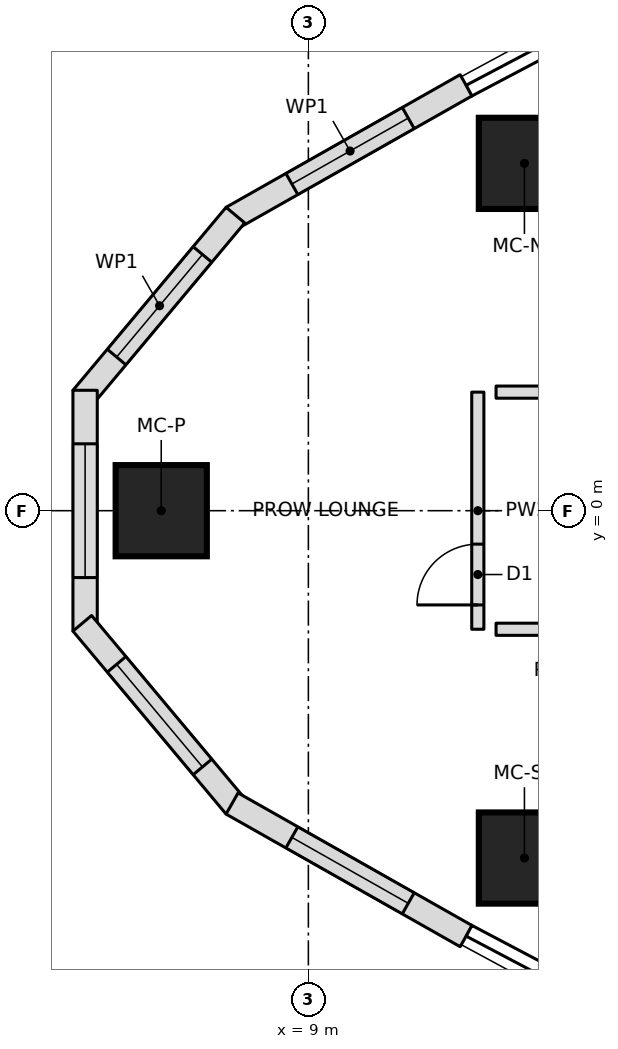
"""IFC4 building model, lengths in metres.
Left out: names, types, materials, properties, quantities, classifications, styles, units other than length and angle.
Written with IfcOpenShell. Run it as: python <this file> out.ifc"""

import sys

from ifc_helpers import new_model, si_unit, direction, frame, frame_2d, origin, origin_2d, place, context, subcontext, project, spatial, polyline, rectangle, outline, extrude, element, fill, save


model = new_model("IFC4")
c1 = context("Model", 3, precision=1e-05, world=origin(), true_north=direction((0.0, 1.0)))
c2 = subcontext(c1, "Body", "Model", "MODEL_VIEW")
j1 = project(units=[si_unit("LENGTHUNIT", "METRE"), si_unit("PLANEANGLEUNIT", "RADIAN")], contexts=[c1])
p1 = place(None, origin())
s1 = spatial("IfcSite", under=j1, at=p1, CompositionType="ELEMENT")
p2 = place(p1, origin())
s2 = spatial("IfcBuilding", under=s1, at=p2, CompositionType="ELEMENT")
p3 = place(p2, frame((0.0, 0.0, 140.85)))
s3 = spatial("IfcBuildingStorey", under=s2, at=p3, CompositionType="ELEMENT", Elevation=140.85)
for number, where, z_axis, x_axis in (
    (1, (6.58, 0.0, 0.0), (0.0, 0.0, 1.0), (1.0, 0.0, 0.0)),
    (2, (12.553, -5.713, 0.0), (0.0, 0.0, 1.0), (1.0, 0.0, 0.0)),
    (3, (12.553, 5.713, 0.0), (0.0, 0.0, 1.0), (1.0, 0.0, 0.0)),
):
    element("IfcColumn", number, at=place(p3, frame(where, z_axis=z_axis, x_axis=x_axis)), inside=s3, PredefinedType="COLUMN", context=c2, shape_type="SweptSolid", body=[
        extrude(rectangle(XDim=1.5, YDim=1.5, at=origin_2d()), origin(), (0.0, 0.0, 1.0), 3.55),
    ])
p4 = place(p3, frame((11.594, 6.997, 0.0), z_axis=(0.0, 0.0, 1.0), x_axis=(-0.870045255208, -0.492971859125, 0.0)))
e4 = element("IfcWall", 4, at=p4, inside=s3, PredefinedType="NOTDEFINED", context=c2, shape_type="SweptSolid", body=[
    extrude(outline(polyline([(0.0, -0.2), (4.424, -0.2), (4.352, 0.2), (0.0, 0.2), (0.0, -0.2)])), origin(), (0.0, 0.0, 1.0), 3.25),
])
p5 = place(p4, frame((1.094, 0.0, 0.6)))
e5 = element("IfcOpeningElement", 5, at=p5, cuts=e4, PredefinedType="OPENING", context=c2, shape_type="SweptSolid", body=[
    extrude(outline(polyline([(0.0, 1.35), (0.084, 1.771), (0.322, 2.128), (0.679, 2.366), (1.1, 2.45), (1.521, 2.366), (1.878, 2.128), (2.116, 1.771), (2.2, 1.35), (2.2, 1.1), (2.116, 0.679), (1.878, 0.322), (1.521, 0.084), (1.1, 0.0), (0.679, 0.084), (0.322, 0.322), (0.084, 0.679), (0.0, 1.1), (0.0, 1.35)])), frame((0.0, 0.21, 0.0), z_axis=(0.0, -1.0, 0.0), x_axis=(1.0, 0.0, 0.0)), (0.0, 0.0, 1.0), 0.42),
])
p6 = place(p3, frame((7.777, 4.834, 0.0), z_axis=(0.0, 0.0, 1.0), x_axis=(-0.641787918235, -0.766882173484, 0.0)))
e6 = element("IfcWall", 6, at=p6, inside=s3, PredefinedType="NOTDEFINED", context=c2, shape_type="SweptSolid", body=[
    extrude(outline(polyline([(-0.036, -0.2), (3.888, -0.2), (3.743, 0.2), (0.036, 0.2), (-0.036, -0.2)])), origin(), (0.0, 0.0, 1.0), 3.25),
])
p7 = place(p6, frame((0.808, 0.0, 0.6)))
e7 = element("IfcOpeningElement", 7, at=p7, cuts=e6, PredefinedType="OPENING", context=c2, shape_type="SweptSolid", body=[
    extrude(outline(polyline([(0.0, 1.35), (0.084, 1.771), (0.322, 2.128), (0.679, 2.366), (1.1, 2.45), (1.521, 2.366), (1.878, 2.128), (2.116, 1.771), (2.2, 1.35), (2.2, 1.1), (2.116, 0.679), (1.878, 0.322), (1.521, 0.084), (1.1, 0.0), (0.679, 0.084), (0.322, 0.322), (0.084, 0.679), (0.0, 1.1), (0.0, 1.35)])), frame((0.0, 0.21, 0.0), z_axis=(0.0, -1.0, 0.0), x_axis=(1.0, 0.0, 0.0)), (0.0, 0.0, 1.0), 0.42),
])
p8 = place(p3, frame((5.328, 1.908, 0.0), z_axis=(0.0, 0.0, 1.0), x_axis=(0.0, -1.0, 0.0)))
e8 = element("IfcWall", 8, at=p8, inside=s3, PredefinedType="NOTDEFINED", context=c2, shape_type="SweptSolid", body=[
    extrude(outline(polyline([(-0.073, -0.2), (3.888, -0.2), (3.743, 0.2), (0.073, 0.2), (-0.073, -0.2)])), origin(), (0.0, 0.0, 1.0), 3.25),
])
p9 = place(p8, frame((0.808, 0.0, 0.6)))
e9 = element("IfcOpeningElement", 9, at=p9, cuts=e8, PredefinedType="OPENING", context=c2, shape_type="SweptSolid", body=[
    extrude(outline(polyline([(0.0, 1.35), (0.084, 1.771), (0.322, 2.128), (0.679, 2.366), (1.1, 2.45), (1.521, 2.366), (1.878, 2.128), (2.116, 1.771), (2.2, 1.35), (2.2, 1.1), (2.116, 0.679), (1.878, 0.322), (1.521, 0.084), (1.1, 0.0), (0.679, 0.084), (0.322, 0.322), (0.084, 0.679), (0.0, 1.1), (0.0, 1.35)])), frame((0.0, 0.21, 0.0), z_axis=(0.0, -1.0, 0.0), x_axis=(1.0, 0.0, 0.0)), (0.0, 0.0, 1.0), 0.42),
])
p10 = place(p3, frame((5.328, -1.908, 0.0), z_axis=(0.0, 0.0, 1.0), x_axis=(0.641787918235, -0.766882173484, 0.0)))
e10 = element("IfcWall", 10, at=p10, inside=s3, PredefinedType="NOTDEFINED", context=c2, shape_type="SweptSolid", body=[
    extrude(outline(polyline([(-0.073, -0.2), (3.852, -0.2), (3.779, 0.2), (0.073, 0.2), (-0.073, -0.2)])), origin(), (0.0, 0.0, 1.0), 3.25),
])
p11 = place(p10, frame((0.808, 0.0, 0.6)))
e11 = element("IfcOpeningElement", 11, at=p11, cuts=e10, PredefinedType="OPENING", context=c2, shape_type="SweptSolid", body=[
    extrude(outline(polyline([(0.0, 1.35), (0.084, 1.771), (0.322, 2.128), (0.679, 2.366), (1.1, 2.45), (1.521, 2.366), (1.878, 2.128), (2.116, 1.771), (2.2, 1.35), (2.2, 1.1), (2.116, 0.679), (1.878, 0.322), (1.521, 0.084), (1.1, 0.0), (0.679, 0.084), (0.322, 0.322), (0.084, 0.679), (0.0, 1.1), (0.0, 1.35)])), frame((0.0, 0.21, 0.0), z_axis=(0.0, -1.0, 0.0), x_axis=(1.0, 0.0, 0.0)), (0.0, 0.0, 1.0), 0.42),
])
p12 = place(p3, frame((7.777, -4.834, 0.0), z_axis=(0.0, 0.0, 1.0), x_axis=(0.870045255208, -0.492971859125, 0.0)))
e12 = element("IfcWall", 12, at=p12, inside=s3, PredefinedType="NOTDEFINED", context=c2, shape_type="SweptSolid", body=[
    extrude(outline(polyline([(-0.036, -0.2), (4.388, -0.2), (4.388, 0.2), (0.036, 0.2), (-0.036, -0.2)])), origin(), (0.0, 0.0, 1.0), 3.25),
])
p13 = place(p12, frame((1.094, 0.0, 0.6)))
e13 = element("IfcOpeningElement", 13, at=p13, cuts=e12, PredefinedType="OPENING", context=c2, shape_type="SweptSolid", body=[
    extrude(outline(polyline([(0.0, 1.35), (0.084, 1.771), (0.322, 2.128), (0.679, 2.366), (1.1, 2.45), (1.521, 2.366), (1.878, 2.128), (2.116, 1.771), (2.2, 1.35), (2.2, 1.1), (2.116, 0.679), (1.878, 0.322), (1.521, 0.084), (1.1, 0.0), (0.679, 0.084), (0.322, 0.322), (0.084, 0.679), (0.0, 1.1), (0.0, 1.35)])), frame((0.0, 0.21, 0.0), z_axis=(0.0, -1.0, 0.0), x_axis=(1.0, 0.0, 0.0)), (0.0, 0.0, 1.0), 0.42),
])
p14 = place(p3, frame((12.087, 1.95, 0.0), z_axis=(0.0, 0.0, 1.0), x_axis=(1.0, 0.0, 0.0)))
e14 = element("IfcWall", 14, at=p14, inside=s3, PredefinedType="PARTITIONING", context=c2, shape_type="SweptSolid", body=[
    extrude(rectangle(XDim=3.372, YDim=0.2, at=frame_2d((1.686, 0.0))), origin(), (0.0, 0.0, 1.0), 3.25),
])
p15 = place(p14, frame((1.186, 0.0, 0.0)))
e15 = element("IfcOpeningElement", 15, at=p15, cuts=e14, PredefinedType="OPENING", context=c2, shape_type="SweptSolid", body=[
    extrude(rectangle(XDim=1.0, YDim=2.1, at=frame_2d((0.5, 1.05))), frame((0.0, 0.11, 0.0), z_axis=(0.0, -1.0, 0.0), x_axis=(1.0, 0.0, 0.0)), (0.0, 0.0, 1.0), 0.22),
])
p16 = place(p3, frame((12.087, -1.95, 0.0), z_axis=(0.0, 0.0, 1.0), x_axis=(1.0, 0.0, 0.0)))
e16 = element("IfcWall", 16, at=p16, inside=s3, PredefinedType="PARTITIONING", context=c2, shape_type="SweptSolid", body=[
    extrude(rectangle(XDim=3.372, YDim=0.2, at=frame_2d((1.686, 0.0))), origin(), (0.0, 0.0, 1.0), 3.25),
])
p17 = place(p16, frame((1.186, 0.0, 0.0)))
e17 = element("IfcOpeningElement", 17, at=p17, cuts=e16, PredefinedType="OPENING", context=c2, shape_type="SweptSolid", body=[
    extrude(rectangle(XDim=1.0, YDim=2.1, at=frame_2d((0.5, 1.05))), frame((0.0, 0.11, 0.0), z_axis=(0.0, -1.0, 0.0), x_axis=(1.0, 0.0, 0.0)), (0.0, 0.0, 1.0), 0.22),
])
p18 = place(p3, frame((11.787, -1.95, 0.0), z_axis=(0.0, 0.0, 1.0), x_axis=(0.0, 1.0, 0.0)))
e18 = element("IfcWall", 18, at=p18, inside=s3, PredefinedType="PARTITIONING", context=c2, shape_type="SweptSolid", body=[
    extrude(rectangle(XDim=3.9, YDim=0.2, at=frame_2d((1.95, 0.0))), origin(), (0.0, 0.0, 1.0), 3.25),
])
p19 = place(p18, frame((0.4, 0.0, 0.0)))
e19 = element("IfcOpeningElement", 19, at=p19, cuts=e18, PredefinedType="OPENING", context=c2, shape_type="SweptSolid", body=[
    extrude(rectangle(XDim=1.0, YDim=2.1, at=frame_2d((0.5, 1.05))), frame((0.0, 0.11, 0.0), z_axis=(0.0, -1.0, 0.0), x_axis=(1.0, 0.0, 0.0)), (0.0, 0.0, 1.0), 0.22),
])
p20 = place(p5, origin())
e20 = element("IfcWindow", 20, at=p20, inside=s3, PartitioningType="SINGLE_PANEL", PredefinedType="WINDOW", context=c2, shape_type="SweptSolid", body=[
    extrude(outline(polyline([(0.0, 1.35), (0.084, 1.771), (0.322, 2.128), (0.679, 2.366), (1.1, 2.45), (1.521, 2.366), (1.878, 2.128), (2.116, 1.771), (2.2, 1.35), (2.2, 1.1), (2.116, 0.679), (1.878, 0.322), (1.521, 0.084), (1.1, 0.0), (0.679, 0.084), (0.322, 0.322), (0.084, 0.679), (0.0, 1.1), (0.0, 1.35)])), frame((0.0, 0.17, 0.0), z_axis=(0.0, -1.0, 0.0), x_axis=(1.0, 0.0, 0.0)), (0.0, 0.0, 1.0), 0.06),
])
fill(e5, e20)
p21 = place(p7, origin())
e21 = element("IfcWindow", 21, at=p21, inside=s3, PartitioningType="SINGLE_PANEL", PredefinedType="WINDOW", context=c2, shape_type="SweptSolid", body=[
    extrude(outline(polyline([(0.0, 1.35), (0.084, 1.771), (0.322, 2.128), (0.679, 2.366), (1.1, 2.45), (1.521, 2.366), (1.878, 2.128), (2.116, 1.771), (2.2, 1.35), (2.2, 1.1), (2.116, 0.679), (1.878, 0.322), (1.521, 0.084), (1.1, 0.0), (0.679, 0.084), (0.322, 0.322), (0.084, 0.679), (0.0, 1.1), (0.0, 1.35)])), frame((0.0, 0.17, 0.0), z_axis=(0.0, -1.0, 0.0), x_axis=(1.0, 0.0, 0.0)), (0.0, 0.0, 1.0), 0.06),
])
fill(e7, e21)
p22 = place(p9, origin())
e22 = element("IfcWindow", 22, at=p22, inside=s3, PartitioningType="SINGLE_PANEL", PredefinedType="WINDOW", context=c2, shape_type="SweptSolid", body=[
    extrude(outline(polyline([(0.0, 1.35), (0.084, 1.771), (0.322, 2.128), (0.679, 2.366), (1.1, 2.45), (1.521, 2.366), (1.878, 2.128), (2.116, 1.771), (2.2, 1.35), (2.2, 1.1), (2.116, 0.679), (1.878, 0.322), (1.521, 0.084), (1.1, 0.0), (0.679, 0.084), (0.322, 0.322), (0.084, 0.679), (0.0, 1.1), (0.0, 1.35)])), frame((0.0, 0.17, 0.0), z_axis=(0.0, -1.0, 0.0), x_axis=(1.0, 0.0, 0.0)), (0.0, 0.0, 1.0), 0.06),
])
fill(e9, e22)
p23 = place(p11, origin())
e23 = element("IfcWindow", 23, at=p23, inside=s3, PartitioningType="SINGLE_PANEL", PredefinedType="WINDOW", context=c2, shape_type="SweptSolid", body=[
    extrude(outline(polyline([(0.0, 1.35), (0.084, 1.771), (0.322, 2.128), (0.679, 2.366), (1.1, 2.45), (1.521, 2.366), (1.878, 2.128), (2.116, 1.771), (2.2, 1.35), (2.2, 1.1), (2.116, 0.679), (1.878, 0.322), (1.521, 0.084), (1.1, 0.0), (0.679, 0.084), (0.322, 0.322), (0.084, 0.679), (0.0, 1.1), (0.0, 1.35)])), frame((0.0, 0.17, 0.0), z_axis=(0.0, -1.0, 0.0), x_axis=(1.0, 0.0, 0.0)), (0.0, 0.0, 1.0), 0.06),
])
fill(e11, e23)
p24 = place(p13, origin())
e24 = element("IfcWindow", 24, at=p24, inside=s3, PartitioningType="SINGLE_PANEL", PredefinedType="WINDOW", context=c2, shape_type="SweptSolid", body=[
    extrude(outline(polyline([(0.0, 1.35), (0.084, 1.771), (0.322, 2.128), (0.679, 2.366), (1.1, 2.45), (1.521, 2.366), (1.878, 2.128), (2.116, 1.771), (2.2, 1.35), (2.2, 1.1), (2.116, 0.679), (1.878, 0.322), (1.521, 0.084), (1.1, 0.0), (0.679, 0.084), (0.322, 0.322), (0.084, 0.679), (0.0, 1.1), (0.0, 1.35)])), frame((0.0, 0.17, 0.0), z_axis=(0.0, -1.0, 0.0), x_axis=(1.0, 0.0, 0.0)), (0.0, 0.0, 1.0), 0.06),
])
fill(e13, e24)
p25 = place(p19, origin())
e25 = element("IfcDoor", 25, at=p25, inside=s3, OperationType="SINGLE_SWING_LEFT", PredefinedType="DOOR", context=c2, shape_type="SweptSolid", body=[
    extrude(rectangle(XDim=1.0, YDim=2.1, at=frame_2d((0.5, 1.05))), frame((0.0, 0.025, 0.0), z_axis=(0.0, -1.0, 0.0), x_axis=(1.0, 0.0, 0.0)), (0.0, 0.0, 1.0), 0.05),
])
fill(e19, e25)
save(model, sys.argv[1])
